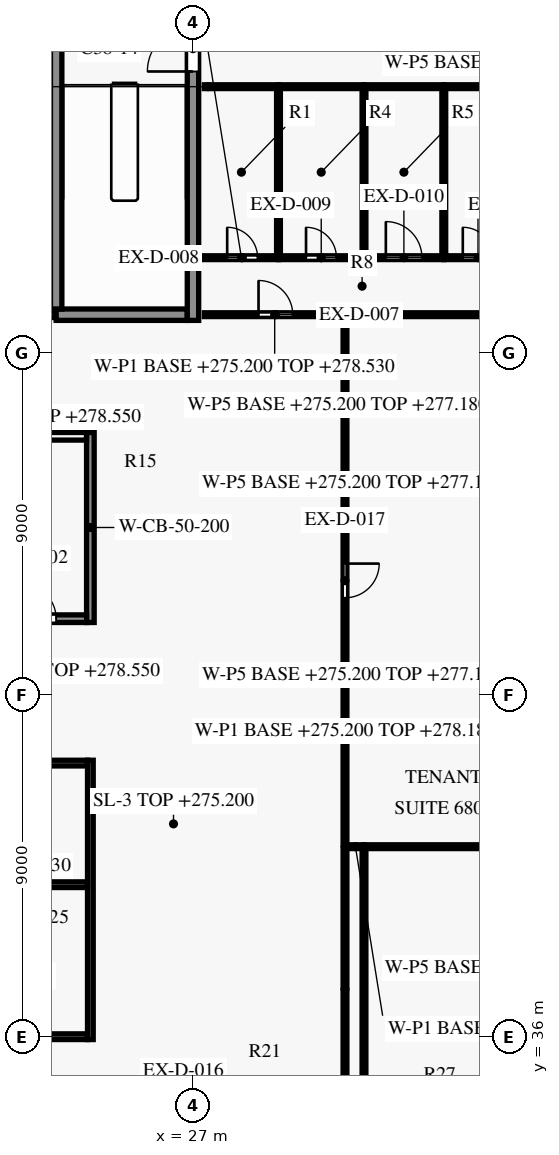
"""IFC4 building model, lengths in metres.
Left out: names, types, materials, properties, quantities, classifications, styles, units other than length and angle.
Written with IfcOpenShell. Run it as: python <this file> out.ifc"""

import sys

from ifc_helpers import new_model, si_unit, direction, frame, frame_2d, origin, place, context, subcontext, project, spatial, rectangle, extrude, element, fill, save


model = new_model("IFC4")
c1 = context("Model", 3, precision=1e-05, world=origin(), true_north=direction((0.0, 1.0)))
c2 = subcontext(c1, "Body", "Model", "MODEL_VIEW")
j1 = project(units=[si_unit("LENGTHUNIT", "METRE"), si_unit("PLANEANGLEUNIT", "RADIAN")], contexts=[c1])
p1 = place(None, origin())
s1 = spatial("IfcSite", under=j1, at=p1, CompositionType="ELEMENT")
p2 = place(p1, origin())
s2 = spatial("IfcBuilding", under=s1, at=p2, CompositionType="ELEMENT")
p3 = place(p2, frame((0.0, 0.0, 275.2)))
s3 = spatial("IfcBuildingStorey", under=s2, at=p3, CompositionType="ELEMENT", Elevation=275.2)
p4 = place(p3, frame((12.4, 36.0, 0.0), z_axis=(0.0, 0.0, 1.0), x_axis=(1.0, 0.0, 0.0)))
e1 = element("IfcWall", 1, at=p4, inside=s3, PredefinedType="SHEAR", context=c2, shape_type="SweptSolid", body=[
    extrude(rectangle(XDim=11.825, YDim=0.15, at=frame_2d((5.913, 0.0))), origin(), (0.0, 0.0, 1.0), 3.5),
])
p5 = place(p4, frame((1.525, 0.0, 0.0)))
e2 = element("IfcOpeningElement", 2, at=p5, cuts=e1, PredefinedType="OPENING", context=c2, shape_type="SweptSolid", body=[
    extrude(rectangle(XDim=0.95, YDim=2.1, at=frame_2d((0.475, 1.05))), frame((0.0, 0.085, 0.0), z_axis=(0.0, -1.0, 0.0), x_axis=(1.0, 0.0, 0.0)), (0.0, 0.0, 1.0), 0.17),
])
p6 = place(p4, frame((5.75, 0.0, 0.0)))
e3 = element("IfcOpeningElement", 3, at=p6, cuts=e1, PredefinedType="OPENING", context=c2, shape_type="SweptSolid", body=[
    extrude(rectangle(XDim=0.9, YDim=2.1, at=frame_2d((0.45, 1.05))), frame((0.0, 0.085, 0.0), z_axis=(0.0, -1.0, 0.0), x_axis=(1.0, 0.0, 0.0)), (0.0, 0.0, 1.0), 0.17),
])
p7 = place(p4, frame((9.7, 0.0, 0.0)))
e4 = element("IfcOpeningElement", 4, at=p7, cuts=e1, PredefinedType="OPENING", context=c2, shape_type="SweptSolid", body=[
    extrude(rectangle(XDim=0.9, YDim=2.1, at=frame_2d((0.45, 1.05))), frame((0.0, 0.085, 0.0), z_axis=(0.0, -1.0, 0.0), x_axis=(1.0, 0.0, 0.0)), (0.0, 0.0, 1.0), 0.17),
])
p8 = place(p3, frame((8.1, 40.0, 0.0), z_axis=(0.0, 0.0, 1.0), x_axis=(1.0, 0.0, 0.0)))
e5 = element("IfcWall", 5, at=p8, inside=s3, PredefinedType="PARTITIONING", context=c2, shape_type="SweptSolid", body=[
    extrude(rectangle(XDim=16.125, YDim=0.15, at=frame_2d((8.062, 0.0))), origin(), (0.0, 0.0, 1.0), 3.35),
])
p9 = place(p3, frame((8.1, 43.2, 0.0), z_axis=(0.0, 0.0, 1.0), x_axis=(1.0, 0.0, 0.0)))
e6 = element("IfcWall", 6, at=p9, inside=s3, PredefinedType="PARTITIONING", context=c2, shape_type="SweptSolid", body=[
    extrude(rectangle(XDim=16.125, YDim=0.15, at=frame_2d((8.062, 0.0))), origin(), (0.0, 0.0, 1.0), 3.35),
])
p10 = place(p9, frame((5.625, 0.0, 0.0)))
e7 = element("IfcOpeningElement", 7, at=p10, cuts=e6, PredefinedType="OPENING", context=c2, shape_type="SweptSolid", body=[
    extrude(rectangle(XDim=0.9, YDim=2.1, at=frame_2d((0.45, 1.05))), frame((0.0, 0.085, 0.0), z_axis=(0.0, -1.0, 0.0), x_axis=(1.0, 0.0, 0.0)), (0.0, 0.0, 1.0), 0.17),
])
p11 = place(p9, frame((13.725, 0.0, 0.0)))
e8 = element("IfcOpeningElement", 8, at=p11, cuts=e6, PredefinedType="OPENING", context=c2, shape_type="SweptSolid", body=[
    extrude(rectangle(XDim=0.9, YDim=2.1, at=frame_2d((0.45, 1.05))), frame((0.0, 0.085, 0.0), z_axis=(0.0, -1.0, 0.0), x_axis=(1.0, 0.0, 0.0)), (0.0, 0.0, 1.0), 0.17),
])
p12 = place(p3, frame((21.6, 47.0, 0.0), z_axis=(0.0, 0.0, 1.0), x_axis=(1.0, 0.0, 0.0)))
e9 = element("IfcWall", 9, at=p12, inside=s3, PredefinedType="PARTITIONING", context=c2, shape_type="SweptSolid", body=[
    extrude(rectangle(XDim=2.6, YDim=0.2, at=frame_2d((1.3, 0.0))), origin(), (0.0, 0.0, 1.0), 3.35),
])
p13 = place(p12, frame((0.9, 0.0, 0.0)))
e10 = element("IfcOpeningElement", 10, at=p13, cuts=e9, PredefinedType="OPENING", context=c2, shape_type="SweptSolid", body=[
    extrude(rectangle(XDim=0.9, YDim=2.1, at=frame_2d((0.45, 1.05))), frame((0.0, 0.11, 0.0), z_axis=(0.0, -1.0, 0.0), x_axis=(1.0, 0.0, 0.0)), (0.0, 0.0, 1.0), 0.22),
])
p14 = place(p3, frame((21.6, 51.8, 0.0), z_axis=(0.0, 0.0, 1.0), x_axis=(1.0, 0.0, 0.0)))
e11 = element("IfcWall", 11, at=p14, inside=s3, PredefinedType="PARTITIONING", context=c2, shape_type="SweptSolid", body=[
    extrude(rectangle(XDim=2.6, YDim=0.2, at=frame_2d((1.3, 0.0))), origin(), (0.0, 0.0, 1.0), 3.35),
])
p15 = place(p3, frame((13.5, 55.0, 0.0), z_axis=(0.0, 0.0, 1.0), x_axis=(1.0, 0.0, 0.0)))
e12 = element("IfcWall", 12, at=p15, inside=s3, PredefinedType="PARTITIONING", context=c2, shape_type="SweptSolid", body=[
    extrude(rectangle(XDim=9.9, YDim=0.15, at=frame_2d((4.95, 0.0))), origin(), (0.0, 0.0, 1.0), 3.35),
])
p16 = place(p15, frame((2.45, 0.0, 0.0)))
e13 = element("IfcOpeningElement", 13, at=p16, cuts=e12, PredefinedType="OPENING", context=c2, shape_type="SweptSolid", body=[
    extrude(rectangle(XDim=1.0, YDim=2.1, at=frame_2d((0.5, 1.05))), frame((0.0, 0.085, 0.0), z_axis=(0.0, -1.0, 0.0), x_axis=(1.0, 0.0, 0.0)), (0.0, 0.0, 1.0), 0.17),
])
p17 = place(p15, frame((7.4, 0.0, 0.0)))
e14 = element("IfcOpeningElement", 14, at=p17, cuts=e12, PredefinedType="OPENING", context=c2, shape_type="SweptSolid", body=[
    extrude(rectangle(XDim=1.0, YDim=2.1, at=frame_2d((0.5, 1.05))), frame((0.0, 0.085, 0.0), z_axis=(0.0, -1.0, 0.0), x_axis=(1.0, 0.0, 0.0)), (0.0, 0.0, 1.0), 0.17),
])
p18 = place(p3, frame((23.4, 55.0, 0.0), z_axis=(0.0, 0.0, 1.0), x_axis=(1.0, 0.0, 0.0)))
e15 = element("IfcWall", 15, at=p18, inside=s3, PredefinedType="SHEAR", context=c2, shape_type="SweptSolid", body=[
    extrude(rectangle(XDim=3.45, YDim=0.3, at=frame_2d((1.725, 0.0))), origin(), (0.0, 0.0, 1.0), 3.5),
])
p19 = place(p3, frame((23.4, 55.15, 0.0), z_axis=(0.0, 0.0, 1.0), x_axis=(0.0, 1.0, 0.0)))
e16 = element("IfcWall", 16, at=p19, inside=s3, PredefinedType="SHEAR", context=c2, shape_type="SweptSolid", body=[
    extrude(rectangle(XDim=8.0, YDim=0.3, at=frame_2d((4.0, 0.0))), origin(), (0.0, 0.0, 1.0), 3.5),
])
p20 = place(p3, frame((24.3, 35.925, 0.0), z_axis=(0.0, 0.0, 1.0), x_axis=(0.0, 1.0, 0.0)))
e17 = element("IfcWall", 17, at=p20, inside=s3, PredefinedType="PARTITIONING", context=c2, shape_type="SweptSolid", body=[
    extrude(rectangle(XDim=7.35, YDim=0.15, at=frame_2d((3.675, 0.0))), origin(), (0.0, 0.0, 1.0), 3.35),
])
p21 = place(p3, frame((24.3, 46.9, 0.0), z_axis=(0.0, 0.0, 1.0), x_axis=(0.0, 1.0, 0.0)))
e18 = element("IfcWall", 18, at=p21, inside=s3, PredefinedType="SHEAR", context=c2, shape_type="SweptSolid", body=[
    extrude(rectangle(XDim=5.0, YDim=0.2, at=frame_2d((2.5, 0.0))), origin(), (0.0, 0.0, 1.0), 3.5),
])
p22 = place(p3, frame((27.0, 54.85, 0.0), z_axis=(0.0, 0.0, 1.0), x_axis=(0.0, 1.0, 0.0)))
e19 = element("IfcWall", 19, at=p22, inside=s3, PredefinedType="SHEAR", context=c2, shape_type="SweptSolid", body=[
    extrude(rectangle(XDim=8.6, YDim=0.3, at=frame_2d((4.3, 0.0))), origin(), (0.0, 0.0, 1.0), 3.5),
])
p23 = place(p22, frame((6.55, 0.0, 0.0)))
e20 = element("IfcOpeningElement", 20, at=p23, cuts=e19, PredefinedType="OPENING", context=c2, shape_type="SweptSolid", body=[
    extrude(rectangle(XDim=1.2, YDim=2.2, at=frame_2d((0.6, 1.1))), frame((0.0, 0.16, 0.0), z_axis=(0.0, -1.0, 0.0), x_axis=(1.0, 0.0, 0.0)), (0.0, 0.0, 1.0), 0.32),
])
p24 = place(p3, frame((31.0, 40.95, 0.0), z_axis=(0.0, 0.0, 1.0), x_axis=(0.0, -1.0, 0.0)))
e21 = element("IfcWall", 21, at=p24, inside=s3, PredefinedType="PARTITIONING", context=c2, shape_type="SweptSolid", body=[
    extrude(rectangle(XDim=7.4, YDim=0.1, at=frame_2d((3.7, 0.0))), origin(), (0.0, 0.0, 1.0), 2.98),
])
p25 = place(p3, frame((31.5, 40.95, 0.0), z_axis=(0.0, 0.0, 1.0), x_axis=(0.0, -1.0, 0.0)))
e22 = element("IfcWall", 22, at=p25, inside=s3, PredefinedType="PARTITIONING", context=c2, shape_type="SweptSolid", body=[
    extrude(rectangle(XDim=13.78, YDim=0.1, at=frame_2d((6.89, 0.0))), origin(), (0.0, 0.0, 1.0), 1.98),
])
p26 = place(p25, frame((6.5, 0.0, 0.0)))
e23 = element("IfcOpeningElement", 23, at=p26, cuts=e22, PredefinedType="OPENING", context=c2, shape_type="SweptSolid", body=[
    extrude(rectangle(XDim=0.9, YDim=2.1, at=frame_2d((0.45, 1.05))), frame((0.0, 0.06, 0.0), z_axis=(0.0, -1.0, 0.0), x_axis=(1.0, 0.0, 0.0)), (0.0, 0.0, 1.0), 0.12),
])
p27 = place(p3, frame((31.05, 41.0, 0.0), z_axis=(0.0, 0.0, 1.0), x_axis=(1.0, 0.0, 0.0)))
e24 = element("IfcWall", 24, at=p27, inside=s3, PredefinedType="PARTITIONING", context=c2, shape_type="SweptSolid", body=[
    extrude(rectangle(XDim=0.45, YDim=0.1, at=frame_2d((0.225, 0.0))), origin(), (0.0, 0.0, 1.0), 3.33),
])
p28 = place(p3, frame((35.95, 41.0, 0.0), z_axis=(0.0, 0.0, 1.0), x_axis=(-1.0, 0.0, 0.0)))
e25 = element("IfcWall", 25, at=p28, inside=s3, PredefinedType="PARTITIONING", context=c2, shape_type="SweptSolid", body=[
    extrude(rectangle(XDim=4.45, YDim=0.1, at=frame_2d((2.225, 0.0))), origin(), (0.0, 0.0, 1.0), 1.98),
])
p29 = place(p3, frame((31.0, 54.95, 0.0), z_axis=(0.0, 0.0, 1.0), x_axis=(0.0, -1.0, 0.0)))
e26 = element("IfcWall", 26, at=p29, inside=s3, PredefinedType="PARTITIONING", context=c2, shape_type="SweptSolid", body=[
    extrude(rectangle(XDim=13.9, YDim=0.1, at=frame_2d((6.95, 0.0))), origin(), (0.0, 0.0, 1.0), 2.98),
])
p30 = place(p29, frame((6.5, 0.0, 0.0)))
e27 = element("IfcOpeningElement", 27, at=p30, cuts=e26, PredefinedType="OPENING", context=c2, shape_type="SweptSolid", body=[
    extrude(rectangle(XDim=0.9, YDim=2.1, at=frame_2d((0.45, 1.05))), frame((0.0, 0.06, 0.0), z_axis=(0.0, -1.0, 0.0), x_axis=(1.0, 0.0, 0.0)), (0.0, 0.0, 1.0), 0.12),
])
p31 = place(p3, frame((27.3, 55.0, 0.0), z_axis=(0.0, 0.0, 1.0), x_axis=(1.0, 0.0, 0.0)))
e28 = element("IfcWall", 28, at=p31, inside=s3, PredefinedType="PARTITIONING", context=c2, shape_type="SweptSolid", body=[
    extrude(rectangle(XDim=3.7, YDim=0.1, at=frame_2d((1.85, 0.0))), origin(), (0.0, 0.0, 1.0), 3.33),
])
p32 = place(p31, frame((1.425, 0.0, 0.0)))
e29 = element("IfcOpeningElement", 29, at=p32, cuts=e28, PredefinedType="OPENING", context=c2, shape_type="SweptSolid", body=[
    extrude(rectangle(XDim=0.9, YDim=2.1, at=frame_2d((0.45, 1.05))), frame((0.0, 0.06, 0.0), z_axis=(0.0, -1.0, 0.0), x_axis=(1.0, 0.0, 0.0)), (0.0, 0.0, 1.0), 0.12),
])
p33 = place(p3, frame((35.6, 55.0, 0.0), z_axis=(0.0, 0.0, 1.0), x_axis=(-1.0, 0.0, 0.0)))
e30 = element("IfcWall", 30, at=p33, inside=s3, PredefinedType="PARTITIONING", context=c2, shape_type="SweptSolid", body=[
    extrude(rectangle(XDim=4.6, YDim=0.1, at=frame_2d((2.3, 0.0))), origin(), (0.0, 0.0, 1.0), 2.88),
])
p34 = place(p3, frame((27.3, 56.5, 0.0), z_axis=(0.0, 0.0, 1.0), x_axis=(1.0, 0.0, 0.0)))
e31 = element("IfcWall", 31, at=p34, inside=s3, PredefinedType="PARTITIONING", context=c2, shape_type="SweptSolid", body=[
    extrude(rectangle(XDim=1.95, YDim=0.1, at=frame_2d((0.975, 0.0))), origin(), (0.0, 0.0, 1.0), 3.33),
])
p35 = place(p34, frame((0.6, 0.0, 0.0)))
e32 = element("IfcOpeningElement", 32, at=p35, cuts=e31, PredefinedType="OPENING", context=c2, shape_type="SweptSolid", body=[
    extrude(rectangle(XDim=0.8, YDim=2.1, at=frame_2d((0.4, 1.05))), frame((0.0, 0.06, 0.0), z_axis=(0.0, -1.0, 0.0), x_axis=(1.0, 0.0, 0.0)), (0.0, 0.0, 1.0), 0.12),
])
p36 = place(p3, frame((29.25, 56.5, 0.0), z_axis=(0.0, 0.0, 1.0), x_axis=(1.0, 0.0, 0.0)))
e33 = element("IfcWall", 33, at=p36, inside=s3, PredefinedType="PARTITIONING", context=c2, shape_type="SweptSolid", body=[
    extrude(rectangle(XDim=2.25, YDim=0.1, at=frame_2d((1.125, 0.0))), origin(), (0.0, 0.0, 1.0), 3.33),
])
p37 = place(p36, frame((0.725, 0.0, 0.0)))
e34 = element("IfcOpeningElement", 34, at=p37, cuts=e33, PredefinedType="OPENING", context=c2, shape_type="SweptSolid", body=[
    extrude(rectangle(XDim=0.8, YDim=2.1, at=frame_2d((0.4, 1.05))), frame((0.0, 0.06, 0.0), z_axis=(0.0, -1.0, 0.0), x_axis=(1.0, 0.0, 0.0)), (0.0, 0.0, 1.0), 0.12),
])
p38 = place(p3, frame((31.5, 56.5, 0.0), z_axis=(0.0, 0.0, 1.0), x_axis=(1.0, 0.0, 0.0)))
e35 = element("IfcWall", 35, at=p38, inside=s3, PredefinedType="PARTITIONING", context=c2, shape_type="SweptSolid", body=[
    extrude(rectangle(XDim=2.1, YDim=0.1, at=frame_2d((1.05, 0.0))), origin(), (0.0, 0.0, 1.0), 3.33),
])
p39 = place(p38, frame((0.575, 0.0, 0.0)))
e36 = element("IfcOpeningElement", 36, at=p39, cuts=e35, PredefinedType="OPENING", context=c2, shape_type="SweptSolid", body=[
    extrude(rectangle(XDim=0.95, YDim=2.1, at=frame_2d((0.475, 1.05))), frame((0.0, 0.06, 0.0), z_axis=(0.0, -1.0, 0.0), x_axis=(1.0, 0.0, 0.0)), (0.0, 0.0, 1.0), 0.12),
])
p40 = place(p3, frame((33.6, 56.5, 0.0), z_axis=(0.0, 0.0, 1.0), x_axis=(1.0, 0.0, 0.0)))
e37 = element("IfcWall", 37, at=p40, inside=s3, PredefinedType="PARTITIONING", context=c2, shape_type="SweptSolid", body=[
    extrude(rectangle(XDim=2.0, YDim=0.1, at=frame_2d((1.0, 0.0))), origin(), (0.0, 0.0, 1.0), 2.88),
])
p41 = place(p40, frame((0.5, 0.0, 0.0)))
e38 = element("IfcOpeningElement", 38, at=p41, cuts=e37, PredefinedType="OPENING", context=c2, shape_type="SweptSolid", body=[
    extrude(rectangle(XDim=0.8, YDim=2.1, at=frame_2d((0.4, 1.05))), frame((0.0, 0.06, 0.0), z_axis=(0.0, -1.0, 0.0), x_axis=(1.0, 0.0, 0.0)), (0.0, 0.0, 1.0), 0.12),
])
p42 = place(p3, frame((29.25, 60.95, 0.0), z_axis=(0.0, 0.0, 1.0), x_axis=(0.0, -1.0, 0.0)))
e39 = element("IfcWall", 39, at=p42, inside=s3, PredefinedType="PARTITIONING", context=c2, shape_type="SweptSolid", body=[
    extrude(rectangle(XDim=4.4, YDim=0.1, at=frame_2d((2.2, 0.0))), origin(), (0.0, 0.0, 1.0), 3.33),
])
for number, where, z_axis, x_axis in (
    (40, (31.5, 60.95, 0.0), (0.0, 0.0, 1.0), (0.0, -1.0, 0.0)),
    (41, (33.6, 60.95, 0.0), (0.0, 0.0, 1.0), (0.0, -1.0, 0.0)),
):
    element("IfcWall", number, at=place(p3, frame(where, z_axis=z_axis, x_axis=x_axis)), inside=s3, PredefinedType="PARTITIONING", context=c2, shape_type="SweptSolid", body=[
        extrude(rectangle(XDim=4.4, YDim=0.1, at=frame_2d((2.2, 0.0))), origin(), (0.0, 0.0, 1.0), 1.98),
    ])
p43 = place(p3, frame((27.3, 61.0, 0.0), z_axis=(0.0, 0.0, 1.0), x_axis=(1.0, 0.0, 0.0)))
e42 = element("IfcWall", 42, at=p43, inside=s3, PredefinedType="PARTITIONING", context=c2, shape_type="SweptSolid", body=[
    extrude(rectangle(XDim=1.95, YDim=0.1, at=frame_2d((0.975, 0.0))), origin(), (0.0, 0.0, 1.0), 3.33),
])
p44 = place(p3, frame((29.25, 61.0, 0.0), z_axis=(0.0, 0.0, 1.0), x_axis=(1.0, 0.0, 0.0)))
e43 = element("IfcWall", 43, at=p44, inside=s3, PredefinedType="PARTITIONING", context=c2, shape_type="SweptSolid", body=[
    extrude(rectangle(XDim=2.25, YDim=0.1, at=frame_2d((1.125, 0.0))), origin(), (0.0, 0.0, 1.0), 1.98),
])
p45 = place(p3, frame((31.5, 61.0, 0.0), z_axis=(0.0, 0.0, 1.0), x_axis=(1.0, 0.0, 0.0)))
e44 = element("IfcWall", 44, at=p45, inside=s3, PredefinedType="PARTITIONING", context=c2, shape_type="SweptSolid", body=[
    extrude(rectangle(XDim=2.1, YDim=0.1, at=frame_2d((1.05, 0.0))), origin(), (0.0, 0.0, 1.0), 1.98),
])
p46 = place(p3, frame((33.6, 61.0, 0.0), z_axis=(0.0, 0.0, 1.0), x_axis=(1.0, 0.0, 0.0)))
e45 = element("IfcWall", 45, at=p46, inside=s3, PredefinedType="PARTITIONING", context=c2, shape_type="SweptSolid", body=[
    extrude(rectangle(XDim=2.45, YDim=0.1, at=frame_2d((1.225, 0.0))), origin(), (0.0, 0.0, 1.0), 2.73),
])
p47 = place(p13, origin())
e46 = element("IfcDoor", 46, at=p47, inside=s3, OperationType="SINGLE_SWING_LEFT", PredefinedType="DOOR", context=c2, shape_type="SweptSolid", body=[
    extrude(rectangle(XDim=0.9, YDim=2.1, at=frame_2d((0.45, 1.05))), frame((0.0, 0.025, 0.0), z_axis=(0.0, -1.0, 0.0), x_axis=(1.0, 0.0, 0.0)), (0.0, 0.0, 1.0), 0.05),
])
fill(e10, e46)
p48 = place(p23, origin())
e47 = element("IfcDoor", 47, at=p48, inside=s3, OperationType="SINGLE_SWING_LEFT", PredefinedType="DOOR", context=c2, shape_type="SweptSolid", body=[
    extrude(rectangle(XDim=1.2, YDim=2.2, at=frame_2d((0.6, 1.1))), frame((0.0, 0.025, 0.0), z_axis=(0.0, -1.0, 0.0), x_axis=(1.0, 0.0, 0.0)), (0.0, 0.0, 1.0), 0.05),
])
fill(e20, e47)
p49 = place(p32, origin())
e48 = element("IfcDoor", 48, at=p49, inside=s3, OperationType="SINGLE_SWING_RIGHT", PredefinedType="DOOR", context=c2, shape_type="SweptSolid", body=[
    extrude(rectangle(XDim=0.9, YDim=2.1, at=frame_2d((0.45, 1.05))), frame((0.0, 0.025, 0.0), z_axis=(0.0, -1.0, 0.0), x_axis=(1.0, 0.0, 0.0)), (0.0, 0.0, 1.0), 0.05),
])
fill(e29, e48)
p50 = place(p35, origin())
e49 = element("IfcDoor", 49, at=p50, inside=s3, OperationType="SINGLE_SWING_LEFT", PredefinedType="DOOR", context=c2, shape_type="SweptSolid", body=[
    extrude(rectangle(XDim=0.8, YDim=2.1, at=frame_2d((0.4, 1.05))), frame((0.0, 0.025, 0.0), z_axis=(0.0, -1.0, 0.0), x_axis=(1.0, 0.0, 0.0)), (0.0, 0.0, 1.0), 0.05),
])
fill(e32, e49)
p51 = place(p37, origin())
e50 = element("IfcDoor", 50, at=p51, inside=s3, OperationType="SINGLE_SWING_RIGHT", PredefinedType="DOOR", context=c2, shape_type="SweptSolid", body=[
    extrude(rectangle(XDim=0.8, YDim=2.1, at=frame_2d((0.4, 1.05))), frame((0.0, 0.025, 0.0), z_axis=(0.0, -1.0, 0.0), x_axis=(1.0, 0.0, 0.0)), (0.0, 0.0, 1.0), 0.05),
])
fill(e34, e50)
p52 = place(p39, origin())
e51 = element("IfcDoor", 51, at=p52, inside=s3, OperationType="SINGLE_SWING_LEFT", PredefinedType="DOOR", context=c2, shape_type="SweptSolid", body=[
    extrude(rectangle(XDim=0.95, YDim=2.1, at=frame_2d((0.475, 1.05))), frame((0.0, 0.025, 0.0), z_axis=(0.0, -1.0, 0.0), x_axis=(1.0, 0.0, 0.0)), (0.0, 0.0, 1.0), 0.05),
])
fill(e36, e51)
p53 = place(p41, origin())
e52 = element("IfcDoor", 52, at=p53, inside=s3, OperationType="SINGLE_SWING_LEFT", PredefinedType="DOOR", context=c2, shape_type="SweptSolid", body=[
    extrude(rectangle(XDim=0.8, YDim=2.1, at=frame_2d((0.4, 1.05))), frame((0.0, 0.025, 0.0), z_axis=(0.0, -1.0, 0.0), x_axis=(1.0, 0.0, 0.0)), (0.0, 0.0, 1.0), 0.05),
])
fill(e38, e52)
p54 = place(p30, origin())
e53 = element("IfcDoor", 53, at=p54, inside=s3, OperationType="SINGLE_SWING_LEFT", PredefinedType="DOOR", context=c2, shape_type="SweptSolid", body=[
    extrude(rectangle(XDim=0.9, YDim=2.1, at=frame_2d((0.45, 1.05))), frame((0.0, 0.025, 0.0), z_axis=(0.0, -1.0, 0.0), x_axis=(1.0, 0.0, 0.0)), (0.0, 0.0, 1.0), 0.05),
])
fill(e27, e53)
save(model, sys.argv[1])
